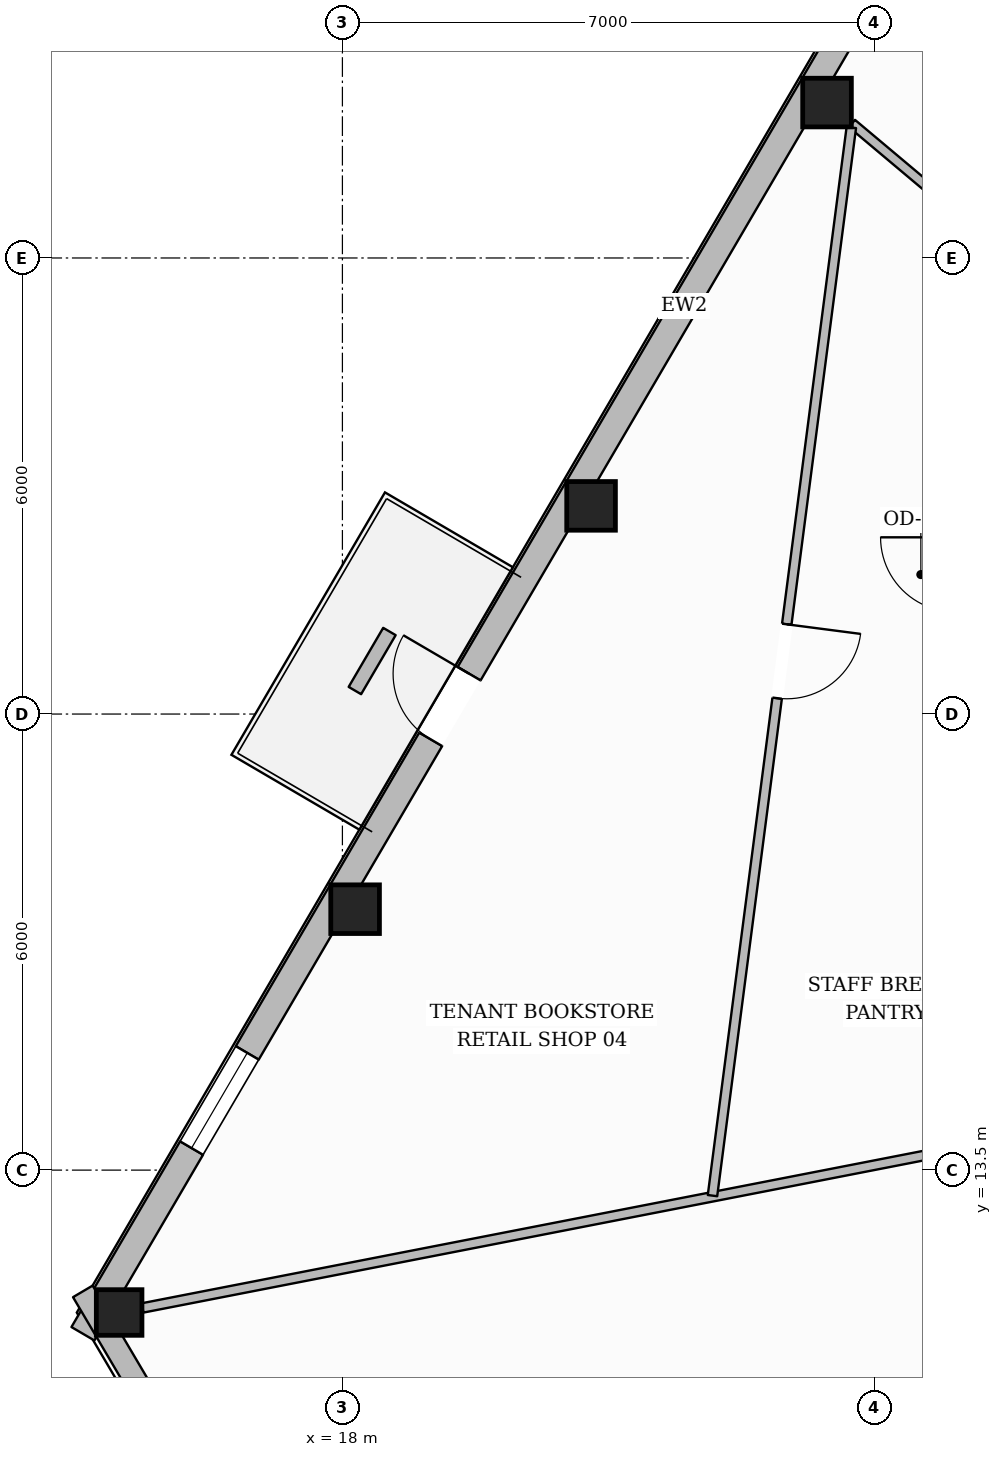
"""IFC4 building model, lengths in metres.
Left out: names, types, materials, properties, quantities, classifications, styles, units other than length and angle.
Written with IfcOpenShell. Run it as: python <this file> out.ifc"""

import sys

from ifc_helpers import new_model, si_unit, direction, frame, frame_2d, origin, origin_2d, place, context, subcontext, project, spatial, rectangle, hollow_rectangle, extrude, element, fill, save


model = new_model("IFC4")
c1 = context("Model", 3, precision=1e-05, world=origin(), true_north=direction((0.0, 1.0)))
c2 = subcontext(c1, "Body", "Model", "MODEL_VIEW")
j1 = project(units=[si_unit("LENGTHUNIT", "METRE"), si_unit("PLANEANGLEUNIT", "RADIAN")], contexts=[c1])
p1 = place(None, origin())
s1 = spatial("IfcSite", under=j1, at=p1, CompositionType="ELEMENT")
p2 = place(p1, origin())
s2 = spatial("IfcBuilding", under=s1, at=p2, CompositionType="ELEMENT")
p3 = place(p2, frame((0.0, 0.0, 199.65)))
s3 = spatial("IfcBuildingStorey", under=s2, at=p3, CompositionType="ELEMENT", Elevation=199.65)
for number, where, z_axis, x_axis in (
    (1, (24.376, 27.544, 0.0), (0.0, 0.0, 1.0), (1.0, 0.0, 0.0)),
    (2, (21.271, 22.239, 0.0), (0.0, 0.0, 1.0), (1.0, 0.0, 0.0)),
    (3, (18.167, 16.933, 0.0), (0.0, 0.0, 1.0), (1.0, 0.0, 0.0)),
):
    element("IfcColumn", number, at=place(p3, frame(where, z_axis=z_axis, x_axis=x_axis)), inside=s3, PredefinedType="COLUMN", context=c2, shape_type="SweptSolid", body=[
        extrude(hollow_rectangle(XDim=0.64, YDim=0.64, WallThickness=0.028, at=origin_2d()), origin(), (0.0, 0.0, 1.0), 3.6),
    ])
p4 = place(p3, frame((15.062, 11.627, 0.0), z_axis=(0.0, 0.0, 1.0), x_axis=(1.0, 0.0, 0.0)))
e4 = element("IfcColumn", 4, at=p4, inside=s3, PredefinedType="COLUMN", context=c2, shape_type="SweptSolid", body=[
    extrude(hollow_rectangle(XDim=0.6, YDim=0.6, WallThickness=0.028, at=origin_2d()), origin(), (0.0, 0.0, 1.0), 3.6),
])
p5 = place(p3, frame((14.586, 11.347, 0.0), z_axis=(0.0, 0.0, 1.0), x_axis=(0.504997770855, 0.863120647089, 0.0)))
e5 = element("IfcWall", 5, at=p5, inside=s3, PredefinedType="STANDARD", context=c2, shape_type="SweptSolid", body=[
    extrude(rectangle(XDim=37.843, YDim=0.35, at=frame_2d((18.921, 0.0))), origin(), (0.0, 0.0, 1.0), 3.132),
])
p6 = place(p5, frame((9.061, 0.0, 0.0)))
e6 = element("IfcOpeningElement", 6, at=p6, cuts=e5, PredefinedType="OPENING", context=c2, shape_type="SweptSolid", body=[
    extrude(rectangle(XDim=1.0, YDim=2.2, at=frame_2d((0.5, 1.1))), frame((0.0, 0.185, 0.0), z_axis=(0.0, -1.0, 0.0), x_axis=(1.0, 0.0, 0.0)), (0.0, 0.0, 1.0), 0.37),
])
p7 = place(p5, frame((33.567, 0.0, 0.65)))
e7 = element("IfcOpeningElement", 7, at=p7, cuts=e5, PredefinedType="OPENING", context=c2, shape_type="SweptSolid", body=[
    extrude(rectangle(XDim=1.45, YDim=1.75, at=frame_2d((0.725, 0.875))), frame((0.0, 0.185, 0.0), z_axis=(0.0, -1.0, 0.0), x_axis=(1.0, 0.0, 0.0)), (0.0, 0.0, 1.0), 0.37),
])
p8 = place(p5, frame((27.42, 0.0, 0.65)))
e8 = element("IfcOpeningElement", 8, at=p8, cuts=e5, PredefinedType="OPENING", context=c2, shape_type="SweptSolid", body=[
    extrude(rectangle(XDim=1.45, YDim=1.75, at=frame_2d((0.725, 0.875))), frame((0.0, 0.185, 0.0), z_axis=(0.0, -1.0, 0.0), x_axis=(1.0, 0.0, 0.0)), (0.0, 0.0, 1.0), 0.37),
])
p9 = place(p5, frame((21.273, 0.0, 0.65)))
e9 = element("IfcOpeningElement", 9, at=p9, cuts=e5, PredefinedType="OPENING", context=c2, shape_type="SweptSolid", body=[
    extrude(rectangle(XDim=1.45, YDim=1.75, at=frame_2d((0.725, 0.875))), frame((0.0, 0.185, 0.0), z_axis=(0.0, -1.0, 0.0), x_axis=(1.0, 0.0, 0.0)), (0.0, 0.0, 1.0), 0.37),
])
p10 = place(p5, frame((2.831, 0.0, 0.65)))
e10 = element("IfcOpeningElement", 10, at=p10, cuts=e5, PredefinedType="OPENING", context=c2, shape_type="SweptSolid", body=[
    extrude(rectangle(XDim=1.45, YDim=1.75, at=frame_2d((0.725, 0.875))), frame((0.0, 0.185, 0.0), z_axis=(0.0, -1.0, 0.0), x_axis=(1.0, 0.0, 0.0)), (0.0, 0.0, 1.0), 0.37),
])
p11 = place(p3, frame((19.431, 3.69, 0.0), z_axis=(0.0, 0.0, 1.0), x_axis=(-0.508074619141, 0.861313056551, 0.0)))
e11 = element("IfcWall", 11, at=p11, inside=s3, PredefinedType="STANDARD", context=c2, shape_type="SweptSolid", body=[
    extrude(rectangle(XDim=9.538, YDim=0.3, at=frame_2d((4.769, 0.0))), origin(), (0.0, 0.0, 1.0), 3.132),
])
p12 = place(p11, frame((4.244, 0.0, 0.65)))
e12 = element("IfcOpeningElement", 12, at=p12, cuts=e11, PredefinedType="OPENING", context=c2, shape_type="SweptSolid", body=[
    extrude(rectangle(XDim=1.05, YDim=1.7, at=frame_2d((0.525, 0.85))), frame((0.0, 0.16, 0.0), z_axis=(0.0, -1.0, 0.0), x_axis=(1.0, 0.0, 0.0)), (0.0, 0.0, 1.0), 0.32),
])
p13 = place(p3, frame((18.619, 20.586, 0.0), z_axis=(0.0, 0.0, 1.0), x_axis=(-0.504848991093, -0.863207678483, 0.0)))
e13 = element("IfcWall", 13, at=p13, inside=s3, PredefinedType="USERDEFINED", context=c2, shape_type="SweptSolid", body=[
    extrude(rectangle(XDim=0.9, YDim=0.19, at=frame_2d((0.45, 0.0))), origin(), (0.0, 0.0, 1.0), 0.5),
])
p14 = place(p3, frame((27.285, 25.101, 0.0), z_axis=(0.0, 0.0, 1.0), x_axis=(-0.765710570965, 0.643185293296, 0.0)))
e14 = element("IfcWall", 14, at=p14, inside=s3, PredefinedType="PARTITIONING", context=c2, shape_type="SweptSolid", body=[
    extrude(rectangle(XDim=3.371, YDim=0.125, at=frame_2d((1.686, 0.0))), origin(), (0.0, 0.0, 1.0), 3.141),
])
p15 = place(p3, frame((27.98, 14.146, 0.0), z_axis=(0.0, 0.0, 1.0), x_axis=(-0.981510799249, -0.191406768317, 0.0)))
e15 = element("IfcWall", 15, at=p15, inside=s3, PredefinedType="PARTITIONING", context=c2, shape_type="SweptSolid", body=[
    extrude(rectangle(XDim=12.847, YDim=0.125, at=frame_2d((6.423, 0.0))), origin(), (0.0, 0.0, 1.0), 3.141),
])
p16 = place(p3, frame((24.695, 27.217, 0.0), z_axis=(0.0, 0.0, 1.0), x_axis=(-0.128889138704, -0.991659008896, 0.0)))
e16 = element("IfcWall", 16, at=p16, inside=s3, PredefinedType="PARTITIONING", context=c2, shape_type="SweptSolid", body=[
    extrude(rectangle(XDim=14.17, YDim=0.125, at=frame_2d((7.085, 0.0))), origin(), (0.0, 0.0, 1.0), 3.339),
])
p17 = place(p16, frame((6.591, 0.0, 0.0)))
e17 = element("IfcOpeningElement", 17, at=p17, cuts=e16, PredefinedType="OPENING", context=c2, shape_type="SweptSolid", body=[
    extrude(rectangle(XDim=0.98, YDim=2.15, at=frame_2d((0.49, 1.075))), frame((0.0, 0.073, 0.0), z_axis=(0.0, -1.0, 0.0), x_axis=(1.0, 0.0, 0.0)), (0.0, 0.0, 1.0), 0.145),
])
p18 = place(p6, origin())
e18 = element("IfcDoor", 18, at=p18, inside=s3, OperationType="SINGLE_SWING_RIGHT", PredefinedType="DOOR", context=c2, shape_type="SweptSolid", body=[
    extrude(rectangle(XDim=1.0, YDim=2.2, at=frame_2d((0.5, 1.1))), frame((0.0, 0.025, 0.0), z_axis=(0.0, -1.0, 0.0), x_axis=(1.0, 0.0, 0.0)), (0.0, 0.0, 1.0), 0.05),
])
fill(e6, e18)
p19 = place(p10, origin())
e19 = element("IfcWindow", 19, at=p19, inside=s3, PartitioningType="SINGLE_PANEL", PredefinedType="WINDOW", context=c2, shape_type="SweptSolid", body=[
    extrude(rectangle(XDim=1.45, YDim=1.75, at=frame_2d((0.725, 0.875))), frame((0.0, 0.03, 0.0), z_axis=(0.0, -1.0, 0.0), x_axis=(1.0, 0.0, 0.0)), (0.0, 0.0, 1.0), 0.06),
])
fill(e10, e19)
p20 = place(p17, origin())
e20 = element("IfcDoor", 20, at=p20, inside=s3, OperationType="SINGLE_SWING_LEFT", PredefinedType="DOOR", context=c2, shape_type="SweptSolid", body=[
    extrude(rectangle(XDim=0.98, YDim=2.15, at=frame_2d((0.49, 1.075))), frame((0.0, 0.025, 0.0), z_axis=(0.0, -1.0, 0.0), x_axis=(1.0, 0.0, 0.0)), (0.0, 0.0, 1.0), 0.05),
])
fill(e17, e20)
save(model, sys.argv[1])
